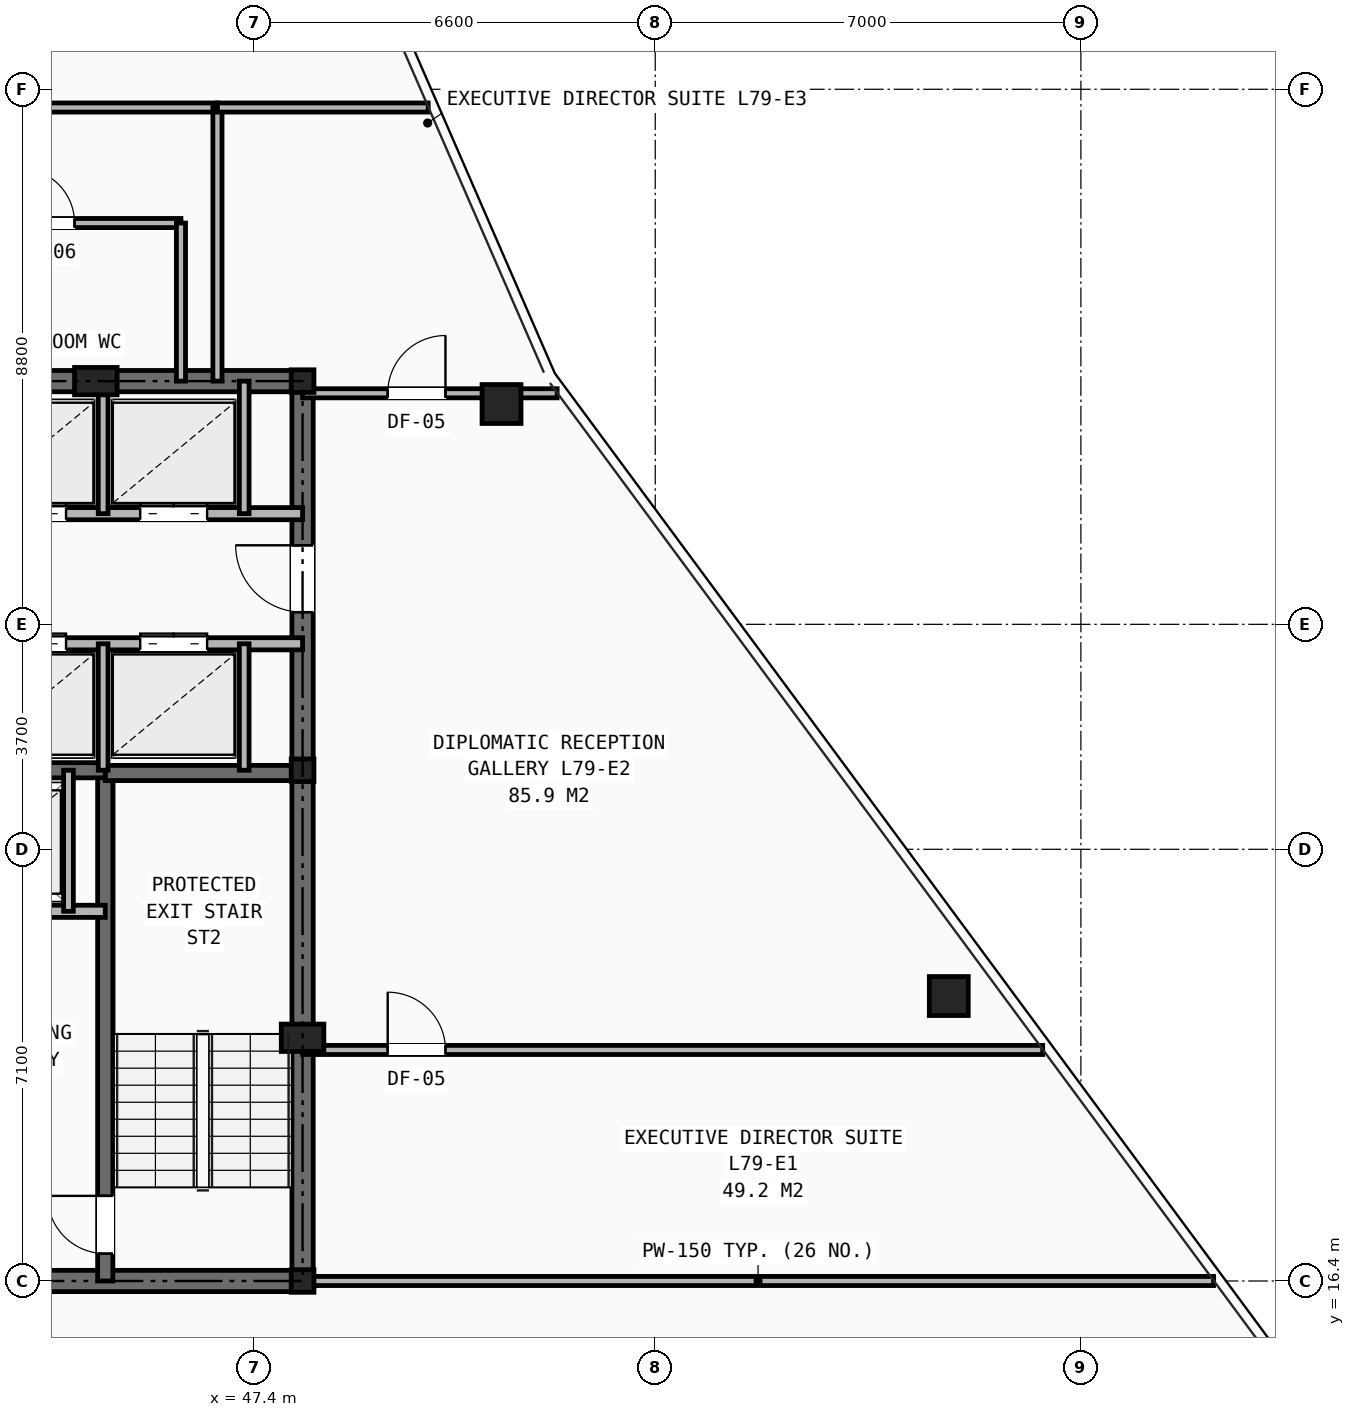
"""IFC4 building model, lengths in metres.
Left out: names, types, materials, properties, quantities, classifications, styles, units other than length and angle.
Written with IfcOpenShell. Run it as: python <this file> out.ifc"""

import sys

from ifc_helpers import new_model, si_unit, direction, frame, frame_2d, origin, origin_2d, place, context, subcontext, project, spatial, rectangle, hollow_rectangle, i_section, extrude, element, fill, save


model = new_model("IFC4")
c1 = context("Model", 3, precision=1e-05, world=origin(), true_north=direction((0.0, 1.0)))
c2 = subcontext(c1, "Body", "Model", "MODEL_VIEW")
j1 = project(units=[si_unit("LENGTHUNIT", "METRE"), si_unit("PLANEANGLEUNIT", "RADIAN")], contexts=[c1])
p1 = place(None, origin())
s1 = spatial("IfcSite", under=j1, at=p1, CompositionType="ELEMENT")
p2 = place(p1, origin())
s2 = spatial("IfcBuilding", under=s1, at=p2, CompositionType="ELEMENT")
p3 = place(p2, frame((0.0, 0.0, 279.5)))
s3 = spatial("IfcBuildingStorey", under=s2, at=p3, CompositionType="ELEMENT", Elevation=279.5)
for number, where, z_axis, x_axis in (
    (1, (48.2, 16.4, 0.0), (0.0, 0.0, 1.0), (1.0, 0.0, 0.0)),
    (2, (48.2, 24.8, 0.0), (0.0, 0.0, 1.0), (1.0, 0.0, 0.0)),
    (3, (48.2, 31.2, 0.0), (0.0, 0.0, 1.0), (1.0, 0.0, 0.0)),
):
    element("IfcColumn", number, at=place(p3, frame(where, z_axis=z_axis, x_axis=x_axis)), inside=s3, PredefinedType="COLUMN", context=c2, shape_type="SweptSolid", body=[
        extrude(i_section(OverallWidth=0.374, OverallDepth=0.372, WebThickness=0.016, FlangeThickness=0.026, at=origin_2d()), origin(), (0.0, 0.0, 1.0), 3.5),
    ])
for number, where, z_axis, x_axis in (
    (4, (48.2, 20.4, 0.0), (0.0, 0.0, 1.0), (1.0, 0.0, 0.0)),
    (5, (44.8, 31.2, 0.0), (0.0, 0.0, 1.0), (1.0, 0.0, 0.0)),
):
    element("IfcColumn", number, at=place(p3, frame(where, z_axis=z_axis, x_axis=x_axis)), inside=s3, PredefinedType="PILASTER", context=c2, shape_type="SweptSolid", body=[
        extrude(rectangle(XDim=0.7, YDim=0.45, at=origin_2d()), origin(), (0.0, 0.0, 1.0), 3.5),
    ])
for number, where, z_axis, x_axis in (
    (6, (58.827, 21.086, 0.0), (0.0, 0.0, 1.0), (1.0, 0.0, 0.0)),
    (7, (51.472, 30.823, 0.0), (0.0, 0.0, 1.0), (1.0, 0.0, 0.0)),
):
    element("IfcColumn", number, at=place(p3, frame(where, z_axis=z_axis, x_axis=x_axis)), inside=s3, PredefinedType="COLUMN", context=c2, shape_type="SweptSolid", body=[
        extrude(hollow_rectangle(XDim=0.64, YDim=0.64, WallThickness=0.045, at=origin_2d()), origin(), (0.0, 0.0, 1.0), 3.5),
    ])
p4 = place(p3, frame((31.8, 16.4, 0.0), z_axis=(0.0, 0.0, 1.0), x_axis=(1.0, 0.0, 0.0)))
e8 = element("IfcWall", 8, at=p4, inside=s3, PredefinedType="SHEAR", context=c2, shape_type="SweptSolid", body=[
    extrude(rectangle(XDim=16.4, YDim=0.35, at=frame_2d((8.2, 0.0))), origin(), (0.0, 0.0, 1.0), 3.25),
])
p5 = place(p4, frame((7.75, 0.0, 0.0)))
e9 = element("IfcOpeningElement", 9, at=p5, cuts=e8, PredefinedType="OPENING", context=c2, shape_type="SweptSolid", body=[
    extrude(rectangle(XDim=0.9, YDim=2.1, at=frame_2d((0.45, 1.05))), frame((0.0, 0.185, 0.0), z_axis=(0.0, -1.0, 0.0), x_axis=(1.0, 0.0, 0.0)), (0.0, 0.0, 1.0), 0.37),
])
p6 = place(p4, frame((4.2, 0.0, 0.0)))
e10 = element("IfcOpeningElement", 10, at=p6, cuts=e8, PredefinedType="OPENING", context=c2, shape_type="SweptSolid", body=[
    extrude(rectangle(XDim=0.95, YDim=2.1, at=frame_2d((0.475, 1.05))), frame((0.0, 0.185, 0.0), z_axis=(0.0, -1.0, 0.0), x_axis=(1.0, 0.0, 0.0)), (0.0, 0.0, 1.0), 0.37),
])
p7 = place(p4, frame((10.6, 0.0, 0.0)))
e11 = element("IfcOpeningElement", 11, at=p7, cuts=e8, PredefinedType="OPENING", context=c2, shape_type="SweptSolid", body=[
    extrude(rectangle(XDim=0.95, YDim=2.1, at=frame_2d((0.475, 1.05))), frame((0.0, 0.185, 0.0), z_axis=(0.0, -1.0, 0.0), x_axis=(1.0, 0.0, 0.0)), (0.0, 0.0, 1.0), 0.37),
])
p8 = place(p3, frame((31.8, 31.2, 0.0), z_axis=(0.0, 0.0, 1.0), x_axis=(1.0, 0.0, 0.0)))
e12 = element("IfcWall", 12, at=p8, inside=s3, PredefinedType="SHEAR", context=c2, shape_type="SweptSolid", body=[
    extrude(rectangle(XDim=16.4, YDim=0.35, at=frame_2d((8.2, 0.0))), origin(), (0.0, 0.0, 1.0), 3.25),
])
p9 = place(p3, frame((48.2, 16.4, 0.0), z_axis=(0.0, 0.0, 1.0), x_axis=(0.0, 1.0, 0.0)))
e13 = element("IfcWall", 13, at=p9, inside=s3, PredefinedType="SHEAR", context=c2, shape_type="SweptSolid", body=[
    extrude(rectangle(XDim=14.8, YDim=0.35, at=frame_2d((7.4, 0.0))), origin(), (0.0, 0.0, 1.0), 3.25),
])
p10 = place(p9, frame((11.0, 0.0, 0.0)))
e14 = element("IfcOpeningElement", 14, at=p10, cuts=e13, PredefinedType="OPENING", context=c2, shape_type="SweptSolid", body=[
    extrude(rectangle(XDim=1.1, YDim=2.15, at=frame_2d((0.55, 1.075))), frame((0.0, 0.185, 0.0), z_axis=(0.0, -1.0, 0.0), x_axis=(1.0, 0.0, 0.0)), (0.0, 0.0, 1.0), 0.37),
])
p11 = place(p3, frame((44.955, 16.4, 0.0), z_axis=(0.0, 0.0, 1.0), x_axis=(0.0, 1.0, 0.0)))
e15 = element("IfcWall", 15, at=p11, inside=s3, PredefinedType="SHEAR", context=c2, shape_type="SweptSolid", body=[
    extrude(rectangle(XDim=8.4, YDim=0.25, at=frame_2d((4.2, 0.0))), origin(), (0.0, 0.0, 1.0), 3.25),
])
p12 = place(p11, frame((0.45, 0.0, 0.0)))
e16 = element("IfcOpeningElement", 16, at=p12, cuts=e15, PredefinedType="OPENING", context=c2, shape_type="SweptSolid", body=[
    extrude(rectangle(XDim=0.95, YDim=2.1, at=frame_2d((0.475, 1.05))), frame((0.0, 0.135, 0.0), z_axis=(0.0, -1.0, 0.0), x_axis=(1.0, 0.0, 0.0)), (0.0, 0.0, 1.0), 0.27),
])
p13 = place(p3, frame((44.955, 24.755, 0.0), z_axis=(0.0, 0.0, 1.0), x_axis=(1.0, 0.0, 0.0)))
e17 = element("IfcWall", 17, at=p13, inside=s3, PredefinedType="SHEAR", context=c2, shape_type="SweptSolid", body=[
    extrude(rectangle(XDim=3.245, YDim=0.25, at=frame_2d((1.623, 0.0))), origin(), (0.0, 0.0, 1.0), 3.25),
])
p14 = place(p3, frame((35.045, 24.8, 0.0), z_axis=(0.0, 0.0, 1.0), x_axis=(1.0, 0.0, 0.0)))
e18 = element("IfcWall", 18, at=p14, inside=s3, PredefinedType="SHEAR", context=c2, shape_type="SweptSolid", body=[
    extrude(rectangle(XDim=9.91, YDim=0.25, at=frame_2d((4.955, 0.0))), origin(), (0.0, 0.0, 1.0), 3.25),
])
p15 = place(p3, frame((35.045, 22.48, 0.0), z_axis=(0.0, 0.0, 1.0), x_axis=(1.0, 0.0, 0.0)))
e19 = element("IfcWall", 19, at=p15, inside=s3, PredefinedType="SOLIDWALL", context=c2, shape_type="SweptSolid", body=[
    extrude(rectangle(XDim=9.91, YDim=0.2, at=frame_2d((4.955, 0.0))), origin(), (0.0, 0.0, 1.0), 3.25),
])
p16 = place(p15, frame((1.255, 0.0, 0.0)))
e20 = element("IfcOpeningElement", 20, at=p16, cuts=e19, PredefinedType="OPENING", context=c2, shape_type="SweptSolid", body=[
    extrude(rectangle(XDim=1.1, YDim=2.15, at=frame_2d((0.55, 1.075))), frame((0.0, 0.11, 0.0), z_axis=(0.0, -1.0, 0.0), x_axis=(1.0, 0.0, 0.0)), (0.0, 0.0, 1.0), 0.22),
])
p17 = place(p15, frame((7.555, 0.0, 0.0)))
e21 = element("IfcOpeningElement", 21, at=p17, cuts=e19, PredefinedType="OPENING", context=c2, shape_type="SweptSolid", body=[
    extrude(rectangle(XDim=1.1, YDim=2.15, at=frame_2d((0.55, 1.075))), frame((0.0, 0.11, 0.0), z_axis=(0.0, -1.0, 0.0), x_axis=(1.0, 0.0, 0.0)), (0.0, 0.0, 1.0), 0.22),
])
p18 = place(p15, frame((4.405, 0.0, 0.0)))
e22 = element("IfcOpeningElement", 22, at=p18, cuts=e19, PredefinedType="OPENING", context=c2, shape_type="SweptSolid", body=[
    extrude(rectangle(XDim=1.1, YDim=2.15, at=frame_2d((0.55, 1.075))), frame((0.0, 0.11, 0.0), z_axis=(0.0, -1.0, 0.0), x_axis=(1.0, 0.0, 0.0)), (0.0, 0.0, 1.0), 0.22),
])
p19 = place(p3, frame((44.35, 22.48, 0.0), z_axis=(0.0, 0.0, 1.0), x_axis=(0.0, 1.0, 0.0)))
e23 = element("IfcWall", 23, at=p19, inside=s3, PredefinedType="SOLIDWALL", context=c2, shape_type="SweptSolid", body=[
    extrude(rectangle(XDim=2.32, YDim=0.16, at=frame_2d((1.16, 0.0))), origin(), (0.0, 0.0, 1.0), 3.25),
])
p20 = place(p3, frame((31.8, 29.02, 0.0), z_axis=(0.0, 0.0, 1.0), x_axis=(1.0, 0.0, 0.0)))
e24 = element("IfcWall", 24, at=p20, inside=s3, PredefinedType="SOLIDWALL", context=c2, shape_type="SweptSolid", body=[
    extrude(rectangle(XDim=16.4, YDim=0.2, at=frame_2d((8.2, 0.0))), origin(), (0.0, 0.0, 1.0), 2.705),
])
p21 = place(p20, frame((0.55, 0.0, 0.0)))
e25 = element("IfcOpeningElement", 25, at=p21, cuts=e24, PredefinedType="OPENING", context=c2, shape_type="SweptSolid", body=[
    extrude(rectangle(XDim=0.85, YDim=2.05, at=frame_2d((0.425, 1.025))), frame((0.0, 0.11, 0.0), z_axis=(0.0, -1.0, 0.0), x_axis=(1.0, 0.0, 0.0)), (0.0, 0.0, 1.0), 0.22),
])
p22 = place(p20, frame((5.94, 0.0, 0.0)))
e26 = element("IfcOpeningElement", 26, at=p22, cuts=e24, PredefinedType="OPENING", context=c2, shape_type="SweptSolid", body=[
    extrude(rectangle(XDim=0.9, YDim=2.1, at=frame_2d((0.45, 1.05))), frame((0.0, 0.11, 0.0), z_axis=(0.0, -1.0, 0.0), x_axis=(1.0, 0.0, 0.0)), (0.0, 0.0, 1.0), 0.22),
])
p23 = place(p20, frame((11.41, 0.0, 0.0)))
e27 = element("IfcOpeningElement", 27, at=p23, cuts=e24, PredefinedType="OPENING", context=c2, shape_type="SweptSolid", body=[
    extrude(rectangle(XDim=1.1, YDim=2.15, at=frame_2d((0.55, 1.075))), frame((0.0, 0.11, 0.0), z_axis=(0.0, -1.0, 0.0), x_axis=(1.0, 0.0, 0.0)), (0.0, 0.0, 1.0), 0.22),
])
p24 = place(p20, frame((13.73, 0.0, 0.0)))
e28 = element("IfcOpeningElement", 28, at=p24, cuts=e24, PredefinedType="OPENING", context=c2, shape_type="SweptSolid", body=[
    extrude(rectangle(XDim=1.1, YDim=2.15, at=frame_2d((0.55, 1.075))), frame((0.0, 0.11, 0.0), z_axis=(0.0, -1.0, 0.0), x_axis=(1.0, 0.0, 0.0)), (0.0, 0.0, 1.0), 0.22),
])
p25 = place(p3, frame((33.82, 26.88, 0.0), z_axis=(0.0, 0.0, 1.0), x_axis=(1.0, 0.0, 0.0)))
e29 = element("IfcWall", 29, at=p25, inside=s3, PredefinedType="SOLIDWALL", context=c2, shape_type="SweptSolid", body=[
    extrude(rectangle(XDim=14.38, YDim=0.2, at=frame_2d((7.19, 0.0))), origin(), (0.0, 0.0, 1.0), 2.705),
])
p26 = place(p25, frame((3.92, 0.0, 0.0)))
e30 = element("IfcOpeningElement", 30, at=p26, cuts=e29, PredefinedType="OPENING", context=c2, shape_type="SweptSolid", body=[
    extrude(rectangle(XDim=0.9, YDim=2.1, at=frame_2d((0.45, 1.05))), frame((0.0, 0.11, 0.0), z_axis=(0.0, -1.0, 0.0), x_axis=(1.0, 0.0, 0.0)), (0.0, 0.0, 1.0), 0.22),
])
p27 = place(p25, frame((9.39, 0.0, 0.0)))
e31 = element("IfcOpeningElement", 31, at=p27, cuts=e29, PredefinedType="OPENING", context=c2, shape_type="SweptSolid", body=[
    extrude(rectangle(XDim=1.1, YDim=2.15, at=frame_2d((0.55, 1.075))), frame((0.0, 0.11, 0.0), z_axis=(0.0, -1.0, 0.0), x_axis=(1.0, 0.0, 0.0)), (0.0, 0.0, 1.0), 0.22),
])
p28 = place(p25, frame((11.71, 0.0, 0.0)))
e32 = element("IfcOpeningElement", 32, at=p28, cuts=e29, PredefinedType="OPENING", context=c2, shape_type="SweptSolid", body=[
    extrude(rectangle(XDim=1.1, YDim=2.15, at=frame_2d((0.55, 1.075))), frame((0.0, 0.11, 0.0), z_axis=(0.0, -1.0, 0.0), x_axis=(1.0, 0.0, 0.0)), (0.0, 0.0, 1.0), 0.22),
])
for number, where, z_axis, x_axis in (
    (33, (44.92, 29.02, 0.0), (0.0, 0.0, 1.0), (0.0, 1.0, 0.0)),
    (34, (47.24, 29.02, 0.0), (0.0, 0.0, 1.0), (0.0, 1.0, 0.0)),
):
    element("IfcWall", number, at=place(p3, frame(where, z_axis=z_axis, x_axis=x_axis)), inside=s3, PredefinedType="SOLIDWALL", context=c2, shape_type="SweptSolid", body=[
        extrude(rectangle(XDim=2.18, YDim=0.16, at=frame_2d((1.09, 0.0))), origin(), (0.0, 0.0, 1.0), 2.705),
    ])
for number, where, z_axis, x_axis in (
    (35, (44.92, 24.8, 0.0), (0.0, 0.0, 1.0), (0.0, 1.0, 0.0)),
    (36, (47.24, 24.8, 0.0), (0.0, 0.0, 1.0), (0.0, 1.0, 0.0)),
):
    element("IfcWall", number, at=place(p3, frame(where, z_axis=z_axis, x_axis=x_axis)), inside=s3, PredefinedType="SOLIDWALL", context=c2, shape_type="SweptSolid", body=[
        extrude(rectangle(XDim=2.08, YDim=0.16, at=frame_2d((1.04, 0.0))), origin(), (0.0, 0.0, 1.0), 3.25),
    ])
p29 = place(p3, frame((33.2, 33.8, 0.0), z_axis=(0.0, 0.0, 1.0), x_axis=(1.0, 0.0, 0.0)))
e37 = element("IfcWall", 37, at=p29, inside=s3, PredefinedType="PARTITIONING", context=c2, shape_type="SweptSolid", body=[
    extrude(rectangle(XDim=13.0, YDim=0.15, at=frame_2d((6.5, 0.0))), origin(), (0.0, 0.0, 1.0), 3.25),
])
p30 = place(p29, frame((1.7, 0.0, 0.0)))
e38 = element("IfcOpeningElement", 38, at=p30, cuts=e37, PredefinedType="OPENING", context=c2, shape_type="SweptSolid", body=[
    extrude(rectangle(XDim=0.9, YDim=2.1, at=frame_2d((0.45, 1.05))), frame((0.0, 0.085, 0.0), z_axis=(0.0, -1.0, 0.0), x_axis=(1.0, 0.0, 0.0)), (0.0, 0.0, 1.0), 0.17),
])
p31 = place(p29, frame((6.0, 0.0, 0.0)))
e39 = element("IfcOpeningElement", 39, at=p31, cuts=e37, PredefinedType="OPENING", context=c2, shape_type="SweptSolid", body=[
    extrude(rectangle(XDim=0.9, YDim=2.1, at=frame_2d((0.45, 1.05))), frame((0.0, 0.085, 0.0), z_axis=(0.0, -1.0, 0.0), x_axis=(1.0, 0.0, 0.0)), (0.0, 0.0, 1.0), 0.17),
])
p32 = place(p29, frame((10.35, 0.0, 0.0)))
e40 = element("IfcOpeningElement", 40, at=p32, cuts=e37, PredefinedType="OPENING", context=c2, shape_type="SweptSolid", body=[
    extrude(rectangle(XDim=0.9, YDim=2.1, at=frame_2d((0.45, 1.05))), frame((0.0, 0.085, 0.0), z_axis=(0.0, -1.0, 0.0), x_axis=(1.0, 0.0, 0.0)), (0.0, 0.0, 1.0), 0.17),
])
p33 = place(p3, frame((46.2, 31.2, 0.0), z_axis=(0.0, 0.0, 1.0), x_axis=(0.0, 1.0, 0.0)))
e41 = element("IfcWall", 41, at=p33, inside=s3, PredefinedType="PARTITIONING", context=c2, shape_type="SweptSolid", body=[
    extrude(rectangle(XDim=2.6, YDim=0.15, at=frame_2d((1.3, 0.0))), origin(), (0.0, 0.0, 1.0), 2.705),
])
p34 = place(p3, frame((48.2, 16.4, 0.0), z_axis=(0.0, 0.0, 1.0), x_axis=(1.0, 0.0, 0.0)))
e42 = element("IfcWall", 42, at=p34, inside=s3, PredefinedType="PARTITIONING", context=c2, shape_type="SweptSolid", body=[
    extrude(rectangle(XDim=14.982, YDim=0.15, at=frame_2d((7.491, 0.0))), origin(), (0.0, 0.0, 1.0), 2.292),
])
p35 = place(p3, frame((40.75, 35.7, 0.0), z_axis=(0.0, 0.0, 1.0), x_axis=(1.0, 0.0, 0.0)))
e43 = element("IfcWall", 43, at=p35, inside=s3, PredefinedType="PARTITIONING", context=c2, shape_type="SweptSolid", body=[
    extrude(rectangle(XDim=6.05, YDim=0.15, at=frame_2d((3.025, 0.0))), origin(), (0.0, 0.0, 1.0), 3.25),
])
p36 = place(p35, frame((0.12, 0.0, 0.0)))
e44 = element("IfcOpeningElement", 44, at=p36, cuts=e43, PredefinedType="OPENING", context=c2, shape_type="SweptSolid", body=[
    extrude(rectangle(XDim=0.95, YDim=2.1, at=frame_2d((0.475, 1.05))), frame((0.0, 0.085, 0.0), z_axis=(0.0, -1.0, 0.0), x_axis=(1.0, 0.0, 0.0)), (0.0, 0.0, 1.0), 0.17),
])
p37 = place(p3, frame((46.8, 31.2, 0.0), z_axis=(0.0, 0.0, 1.0), x_axis=(0.0, 1.0, 0.0)))
e45 = element("IfcWall", 45, at=p37, inside=s3, PredefinedType="PARTITIONING", context=c2, shape_type="SweptSolid", body=[
    extrude(rectangle(XDim=4.5, YDim=0.15, at=frame_2d((2.25, 0.0))), origin(), (0.0, 0.0, 1.0), 2.705),
])
p38 = place(p3, frame((46.8, 35.7, 0.0), z_axis=(0.0, 0.0, 1.0), x_axis=(1.0, 0.0, 0.0)))
e46 = element("IfcWall", 46, at=p38, inside=s3, PredefinedType="PARTITIONING", context=c2, shape_type="SweptSolid", body=[
    extrude(rectangle(XDim=3.466, YDim=0.15, at=frame_2d((1.733, 0.0))), origin(), (0.0, 0.0, 1.0), 2.628),
])
p39 = place(p3, frame((48.2, 20.2, 0.0), z_axis=(0.0, 0.0, 1.0), x_axis=(1.0, 0.0, 0.0)))
e47 = element("IfcWall", 47, at=p39, inside=s3, PredefinedType="PARTITIONING", context=c2, shape_type="SweptSolid", body=[
    extrude(rectangle(XDim=12.172, YDim=0.15, at=frame_2d((6.086, 0.0))), origin(), (0.0, 0.0, 1.0), 2.292),
])
p40 = place(p39, frame((1.4, 0.0, 0.0)))
e48 = element("IfcOpeningElement", 48, at=p40, cuts=e47, PredefinedType="OPENING", context=c2, shape_type="SweptSolid", body=[
    extrude(rectangle(XDim=0.95, YDim=2.1, at=frame_2d((0.475, 1.05))), frame((0.0, 0.085, 0.0), z_axis=(0.0, -1.0, 0.0), x_axis=(1.0, 0.0, 0.0)), (0.0, 0.0, 1.0), 0.17),
])
p41 = place(p3, frame((48.2, 31.0, 0.0), z_axis=(0.0, 0.0, 1.0), x_axis=(1.0, 0.0, 0.0)))
e49 = element("IfcWall", 49, at=p41, inside=s3, PredefinedType="PARTITIONING", context=c2, shape_type="SweptSolid", body=[
    extrude(rectangle(XDim=4.187, YDim=0.15, at=frame_2d((2.093, 0.0))), origin(), (0.0, 0.0, 1.0), 2.292),
])
p42 = place(p41, frame((1.4, 0.0, 0.0)))
e50 = element("IfcOpeningElement", 50, at=p42, cuts=e49, PredefinedType="OPENING", context=c2, shape_type="SweptSolid", body=[
    extrude(rectangle(XDim=0.95, YDim=2.1, at=frame_2d((0.475, 1.05))), frame((0.0, 0.085, 0.0), z_axis=(0.0, -1.0, 0.0), x_axis=(1.0, 0.0, 0.0)), (0.0, 0.0, 1.0), 0.17),
])
p43 = place(p12, origin())
e51 = element("IfcDoor", 51, at=p43, inside=s3, OperationType="SINGLE_SWING_RIGHT", PredefinedType="DOOR", context=c2, shape_type="SweptSolid", body=[
    extrude(rectangle(XDim=0.95, YDim=2.1, at=frame_2d((0.475, 1.05))), frame((0.0, 0.025, 0.0), z_axis=(0.0, -1.0, 0.0), x_axis=(1.0, 0.0, 0.0)), (0.0, 0.0, 1.0), 0.05),
])
fill(e16, e51)
p44 = place(p10, origin())
e52 = element("IfcDoor", 52, at=p44, inside=s3, OperationType="SINGLE_SWING_RIGHT", PredefinedType="DOOR", context=c2, shape_type="SweptSolid", body=[
    extrude(rectangle(XDim=1.1, YDim=2.15, at=frame_2d((0.55, 1.075))), frame((0.0, 0.025, 0.0), z_axis=(0.0, -1.0, 0.0), x_axis=(1.0, 0.0, 0.0)), (0.0, 0.0, 1.0), 0.05),
])
fill(e14, e52)
p45 = place(p23, origin())
e53 = element("IfcDoor", 53, at=p45, inside=s3, OperationType="DOUBLE_DOOR_SLIDING", PredefinedType="DOOR", context=c2, shape_type="SweptSolid", body=[
    extrude(rectangle(XDim=1.1, YDim=2.15, at=frame_2d((0.55, 1.075))), frame((0.0, 0.025, 0.0), z_axis=(0.0, -1.0, 0.0), x_axis=(1.0, 0.0, 0.0)), (0.0, 0.0, 1.0), 0.05),
])
fill(e27, e53)
p46 = place(p24, origin())
e54 = element("IfcDoor", 54, at=p46, inside=s3, OperationType="DOUBLE_DOOR_SLIDING", PredefinedType="DOOR", context=c2, shape_type="SweptSolid", body=[
    extrude(rectangle(XDim=1.1, YDim=2.15, at=frame_2d((0.55, 1.075))), frame((0.0, 0.025, 0.0), z_axis=(0.0, -1.0, 0.0), x_axis=(1.0, 0.0, 0.0)), (0.0, 0.0, 1.0), 0.05),
])
fill(e28, e54)
p47 = place(p27, origin())
e55 = element("IfcDoor", 55, at=p47, inside=s3, OperationType="DOUBLE_DOOR_SLIDING", PredefinedType="DOOR", context=c2, shape_type="SweptSolid", body=[
    extrude(rectangle(XDim=1.1, YDim=2.15, at=frame_2d((0.55, 1.075))), frame((0.0, 0.025, 0.0), z_axis=(0.0, -1.0, 0.0), x_axis=(1.0, 0.0, 0.0)), (0.0, 0.0, 1.0), 0.05),
])
fill(e31, e55)
p48 = place(p28, origin())
e56 = element("IfcDoor", 56, at=p48, inside=s3, OperationType="DOUBLE_DOOR_SLIDING", PredefinedType="DOOR", context=c2, shape_type="SweptSolid", body=[
    extrude(rectangle(XDim=1.1, YDim=2.15, at=frame_2d((0.55, 1.075))), frame((0.0, 0.025, 0.0), z_axis=(0.0, -1.0, 0.0), x_axis=(1.0, 0.0, 0.0)), (0.0, 0.0, 1.0), 0.05),
])
fill(e32, e56)
p49 = place(p32, origin())
e57 = element("IfcDoor", 57, at=p49, inside=s3, OperationType="SINGLE_SWING_LEFT", PredefinedType="DOOR", context=c2, shape_type="SweptSolid", body=[
    extrude(rectangle(XDim=0.9, YDim=2.1, at=frame_2d((0.45, 1.05))), frame((0.0, 0.025, 0.0), z_axis=(0.0, -1.0, 0.0), x_axis=(1.0, 0.0, 0.0)), (0.0, 0.0, 1.0), 0.05),
])
fill(e40, e57)
p50 = place(p40, origin())
e58 = element("IfcDoor", 58, at=p50, inside=s3, OperationType="SINGLE_SWING_LEFT", PredefinedType="DOOR", context=c2, shape_type="SweptSolid", body=[
    extrude(rectangle(XDim=0.95, YDim=2.1, at=frame_2d((0.475, 1.05))), frame((0.0, 0.025, 0.0), z_axis=(0.0, -1.0, 0.0), x_axis=(1.0, 0.0, 0.0)), (0.0, 0.0, 1.0), 0.05),
])
fill(e48, e58)
p51 = place(p42, origin())
e59 = element("IfcDoor", 59, at=p51, inside=s3, OperationType="SINGLE_SWING_RIGHT", PredefinedType="DOOR", context=c2, shape_type="SweptSolid", body=[
    extrude(rectangle(XDim=0.95, YDim=2.1, at=frame_2d((0.475, 1.05))), frame((0.0, 0.025, 0.0), z_axis=(0.0, -1.0, 0.0), x_axis=(1.0, 0.0, 0.0)), (0.0, 0.0, 1.0), 0.05),
])
fill(e50, e59)
save(model, sys.argv[1])
